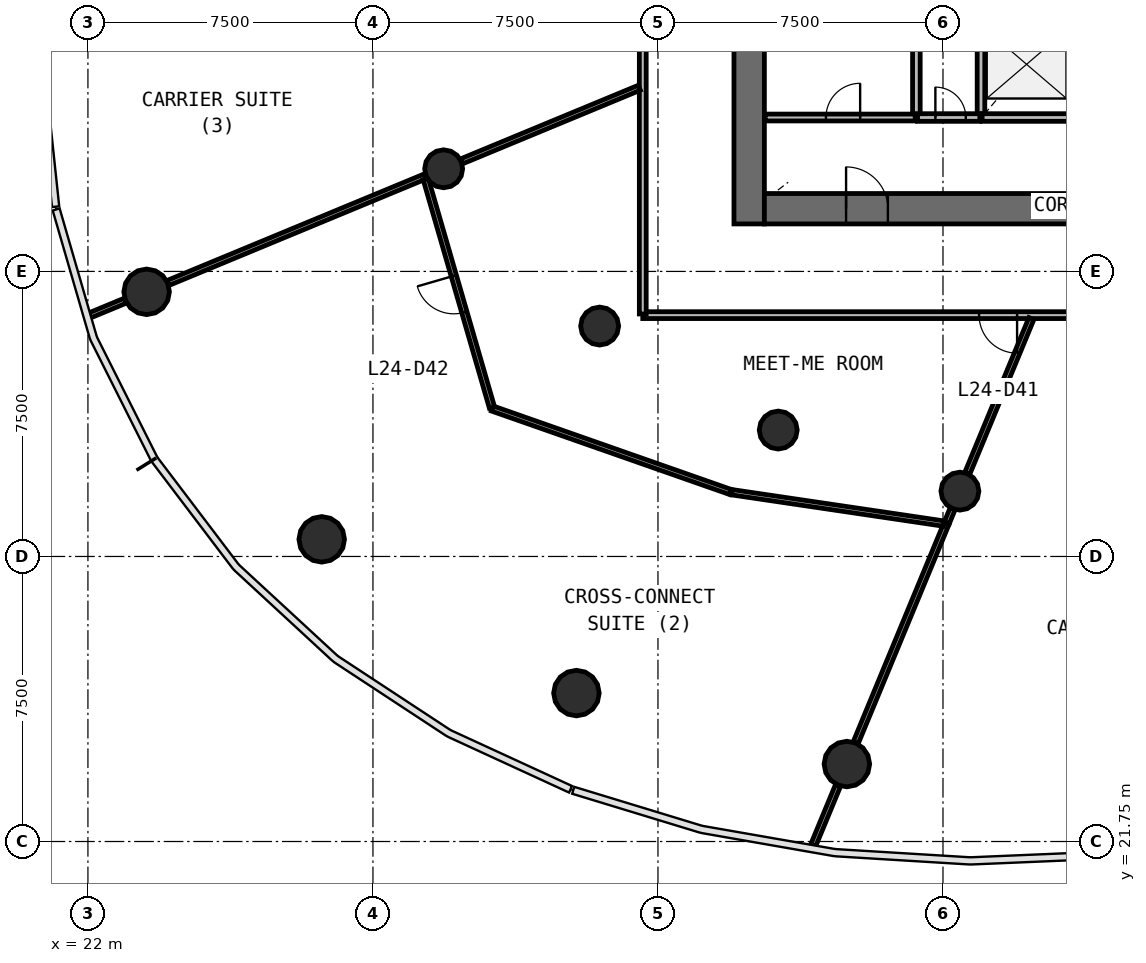
"""IFC4 building model, lengths in metres.
Left out: names, types, materials, properties, quantities, classifications, styles, units other than length and angle.
Written with IfcOpenShell. Run it as: python <this file> out.ifc"""

import sys

from ifc_helpers import new_model, si_unit, direction, frame, frame_2d, origin, origin_2d, place, context, subcontext, project, spatial, rectangle, circle, extrude, source, transform, mapped, element, fill, save


model = new_model("IFC4")
c1 = context("Model", 3, precision=1e-05, world=origin(), true_north=direction((0.0, 1.0)))
c2 = subcontext(c1, "Body", "Model", "MODEL_VIEW")
j1 = project(units=[si_unit("LENGTHUNIT", "METRE"), si_unit("PLANEANGLEUNIT", "RADIAN")], contexts=[c1])
p1 = place(None, origin())
s1 = spatial("IfcSite", under=j1, at=p1, CompositionType="ELEMENT")
p2 = place(p1, origin())
s2 = spatial("IfcBuilding", under=s1, at=p2, CompositionType="ELEMENT")
p3 = place(p2, frame((0.0, 0.0, 104.4)))
s3 = spatial("IfcBuildingStorey", under=s2, at=p3, CompositionType="ELEMENT", Elevation=104.4)
p4 = place(p3, frame((39.4, 58.0, 0.0), z_axis=(0.0, 0.0, 1.0), x_axis=(0.0, -1.0, 0.0)))
e1 = element("IfcWall", 1, at=p4, inside=s3, PredefinedType="SHEAR", context=c2, shape_type="SweptSolid", body=[
    extrude(rectangle(XDim=20.0, YDim=0.8, at=frame_2d((10.0, 0.0))), origin(), (0.0, 0.0, 1.0), 4.1),
])
p5 = place(p4, frame((9.1, 0.0, 0.0)))
e2 = element("IfcOpeningElement", 2, at=p5, cuts=e1, PredefinedType="OPENING", context=c2, shape_type="SweptSolid", body=[
    extrude(rectangle(XDim=1.8, YDim=2.1, at=frame_2d((0.9, 1.05))), frame((0.0, 0.41, 0.0), z_axis=(0.0, -1.0, 0.0), x_axis=(1.0, 0.0, 0.0)), (0.0, 0.0, 1.0), 0.82),
])
p6 = place(p3, frame((39.8, 38.4, 0.0), z_axis=(0.0, 0.0, 1.0), x_axis=(1.0, 0.0, 0.0)))
e3 = element("IfcWall", 3, at=p6, inside=s3, PredefinedType="SHEAR", context=c2, shape_type="SweptSolid", body=[
    extrude(rectangle(XDim=24.4, YDim=0.8, at=frame_2d((12.2, 0.0))), origin(), (0.0, 0.0, 1.0), 4.1),
])
p7 = place(p6, frame((21.65, 0.0, 0.0)))
e4 = element("IfcOpeningElement", 4, at=p7, cuts=e3, PredefinedType="OPENING", context=c2, shape_type="SweptSolid", body=[
    extrude(rectangle(XDim=1.1, YDim=2.1, at=frame_2d((0.55, 1.05))), frame((0.0, 0.41, 0.0), z_axis=(0.0, -1.0, 0.0), x_axis=(1.0, 0.0, 0.0)), (0.0, 0.0, 1.0), 0.82),
])
p8 = place(p6, frame((2.15, 0.0, 0.0)))
e5 = element("IfcOpeningElement", 5, at=p8, cuts=e3, PredefinedType="OPENING", context=c2, shape_type="SweptSolid", body=[
    extrude(rectangle(XDim=1.1, YDim=2.1, at=frame_2d((0.55, 1.05))), frame((0.0, 0.41, 0.0), z_axis=(0.0, -1.0, 0.0), x_axis=(1.0, 0.0, 0.0)), (0.0, 0.0, 1.0), 0.82),
])
m1 = source(origin(), c2, "Body", "SweptSolid", [
    extrude(circle(Radius=0.6, at=origin_2d()), origin(), (0.0, 0.0, 1.0), 4.1),
])
for number, where, z_axis, x_axis in (
    (6, (23.544, 36.213, 0.0), (0.0, 0.0, 1.0), (1.0, 0.0, 0.0)),
    (7, (28.152, 29.701, 0.0), (0.0, 0.0, 1.0), (1.0, 0.0, 0.0)),
    (8, (34.854, 25.655, 0.0), (0.0, 0.0, 1.0), (1.0, 0.0, 0.0)),
    (9, (41.971, 23.788, 0.0), (0.0, 0.0, 1.0), (1.0, 0.0, 0.0)),
):
    element("IfcColumn", number, at=place(p3, frame(where, z_axis=z_axis, x_axis=x_axis)), inside=s3, PredefinedType="COLUMN", context=c2, shape_type="MappedRepresentation", body=[
        mapped(m1, transform((0.0, 0.0, 0.0), scale=1.0)),
    ])
m2 = source(origin(), c2, "Body", "SweptSolid", [
    extrude(circle(Radius=0.5, at=origin_2d()), origin(), (0.0, 0.0, 1.0), 4.1),
])
for number, where, z_axis, x_axis in (
    (10, (31.361, 39.451, 0.0), (0.0, 0.0, 1.0), (1.0, 0.0, 0.0)),
    (11, (35.465, 35.312, 0.0), (0.0, 0.0, 1.0), (1.0, 0.0, 0.0)),
    (12, (40.165, 32.576, 0.0), (0.0, 0.0, 1.0), (1.0, 0.0, 0.0)),
    (13, (44.945, 30.969, 0.0), (0.0, 0.0, 1.0), (1.0, 0.0, 0.0)),
):
    element("IfcColumn", number, at=place(p3, frame(where, z_axis=z_axis, x_axis=x_axis)), inside=s3, PredefinedType="COLUMN", context=c2, shape_type="MappedRepresentation", body=[
        mapped(m2, transform((0.0, 0.0, 0.0), scale=1.0)),
    ])
for number, where, z_axis, x_axis in (
    (14, (43.8, 43.6, 0.0), (0.0, 0.0, 1.0), (0.0, -1.0, 0.0)),
    (15, (45.5, 43.6, 0.0), (0.0, 0.0, 1.0), (0.0, -1.0, 0.0)),
):
    element("IfcWall", number, at=place(p3, frame(where, z_axis=z_axis, x_axis=x_axis)), inside=s3, PredefinedType="SOLIDWALL", context=c2, shape_type="SweptSolid", body=[
        extrude(rectangle(XDim=2.8, YDim=0.2, at=frame_2d((1.4, 0.0))), origin(), (0.0, 0.0, 1.0), 3.7),
    ])
p9 = place(p3, frame((45.53, 40.8, 0.0), z_axis=(0.0, 0.0, 1.0), x_axis=(1.0, 0.0, 0.0)))
e16 = element("IfcWall", 16, at=p9, inside=s3, PredefinedType="SOLIDWALL", context=c2, shape_type="SweptSolid", body=[
    extrude(rectangle(XDim=2.34, YDim=0.2, at=frame_2d((1.17, 0.0))), origin(), (0.0, 0.0, 1.0), 3.7),
])
p10 = place(p3, frame((43.83, 40.8, 0.0), z_axis=(0.0, 0.0, 1.0), x_axis=(1.0, 0.0, 0.0)))
e17 = element("IfcWall", 17, at=p10, inside=s3, PredefinedType="SOLIDWALL", context=c2, shape_type="SweptSolid", body=[
    extrude(rectangle(XDim=1.64, YDim=0.2, at=frame_2d((0.82, 0.0))), origin(), (0.0, 0.0, 1.0), 3.7),
])
p11 = place(p10, frame((0.47, 0.0, 0.0)))
e18 = element("IfcOpeningElement", 18, at=p11, cuts=e17, PredefinedType="OPENING", context=c2, shape_type="SweptSolid", body=[
    extrude(rectangle(XDim=0.8, YDim=2.1, at=frame_2d((0.4, 1.05))), frame((0.0, 0.11, 0.0), z_axis=(0.0, -1.0, 0.0), x_axis=(1.0, 0.0, 0.0)), (0.0, 0.0, 1.0), 0.22),
])
p12 = place(p3, frame((67.4, 35.6, 0.0), z_axis=(0.0, 0.0, 1.0), x_axis=(-1.0, 0.0, 0.0)))
e19 = element("IfcWall", 19, at=p12, inside=s3, PredefinedType="PARTITIONING", context=c2, shape_type="SweptSolid", body=[
    extrude(rectangle(XDim=30.8, YDim=0.18, at=frame_2d((15.4, 0.0))), origin(), (0.0, 0.0, 1.0), 2.9),
])
p13 = place(p12, frame((9.05, 0.0, 0.0)))
e20 = element("IfcOpeningElement", 20, at=p13, cuts=e19, PredefinedType="OPENING", context=c2, shape_type="SweptSolid", body=[
    extrude(rectangle(XDim=0.9, YDim=2.1, at=frame_2d((0.45, 1.05))), frame((0.0, 0.1, 0.0), z_axis=(0.0, -1.0, 0.0), x_axis=(1.0, 0.0, 0.0)), (0.0, 0.0, 1.0), 0.2),
])
p14 = place(p12, frame((6.05, 0.0, 0.0)))
e21 = element("IfcOpeningElement", 21, at=p14, cuts=e19, PredefinedType="OPENING", context=c2, shape_type="SweptSolid", body=[
    extrude(rectangle(XDim=0.9, YDim=2.1, at=frame_2d((0.45, 1.05))), frame((0.0, 0.1, 0.0), z_axis=(0.0, -1.0, 0.0), x_axis=(1.0, 0.0, 0.0)), (0.0, 0.0, 1.0), 0.2),
])
p15 = place(p12, frame((2.45, 0.0, 0.0)))
e22 = element("IfcOpeningElement", 22, at=p15, cuts=e19, PredefinedType="OPENING", context=c2, shape_type="SweptSolid", body=[
    extrude(rectangle(XDim=0.9, YDim=2.1, at=frame_2d((0.45, 1.05))), frame((0.0, 0.1, 0.0), z_axis=(0.0, -1.0, 0.0), x_axis=(1.0, 0.0, 0.0)), (0.0, 0.0, 1.0), 0.2),
])
p16 = place(p12, frame((20.95, 0.0, 0.0)))
e23 = element("IfcOpeningElement", 23, at=p16, cuts=e19, PredefinedType="OPENING", context=c2, shape_type="SweptSolid", body=[
    extrude(rectangle(XDim=1.0, YDim=2.1, at=frame_2d((0.5, 1.05))), frame((0.0, 0.1, 0.0), z_axis=(0.0, -1.0, 0.0), x_axis=(1.0, 0.0, 0.0)), (0.0, 0.0, 1.0), 0.2),
])
p17 = place(p12, frame((14.95, 0.0, 0.0)))
e24 = element("IfcOpeningElement", 24, at=p17, cuts=e19, PredefinedType="OPENING", context=c2, shape_type="SweptSolid", body=[
    extrude(rectangle(XDim=1.0, YDim=2.1, at=frame_2d((0.5, 1.05))), frame((0.0, 0.1, 0.0), z_axis=(0.0, -1.0, 0.0), x_axis=(1.0, 0.0, 0.0)), (0.0, 0.0, 1.0), 0.2),
])
p18 = place(p12, frame((12.55, 0.0, 0.0)))
e25 = element("IfcOpeningElement", 25, at=p18, cuts=e19, PredefinedType="OPENING", context=c2, shape_type="SweptSolid", body=[
    extrude(rectangle(XDim=1.0, YDim=2.1, at=frame_2d((0.5, 1.05))), frame((0.0, 0.1, 0.0), z_axis=(0.0, -1.0, 0.0), x_axis=(1.0, 0.0, 0.0)), (0.0, 0.0, 1.0), 0.2),
])
p19 = place(p3, frame((36.6, 35.63, 0.0), z_axis=(0.0, 0.0, 1.0), x_axis=(0.0, 1.0, 0.0)))
e26 = element("IfcWall", 26, at=p19, inside=s3, PredefinedType="PARTITIONING", context=c2, shape_type="SweptSolid", body=[
    extrude(rectangle(XDim=23.583, YDim=0.18, at=frame_2d((11.791, 0.0))), origin(), (0.0, 0.0, 1.0), 2.9),
])
p20 = place(p19, frame((11.333, 0.0, 0.0)))
e27 = element("IfcOpeningElement", 27, at=p20, cuts=e26, PredefinedType="OPENING", context=c2, shape_type="SweptSolid", body=[
    extrude(rectangle(XDim=1.0, YDim=2.1, at=frame_2d((0.5, 1.05))), frame((0.0, 0.1, 0.0), z_axis=(0.0, -1.0, 0.0), x_axis=(1.0, 0.0, 0.0)), (0.0, 0.0, 1.0), 0.2),
])
p21 = place(p19, frame((9.133, 0.0, 0.0)))
e28 = element("IfcOpeningElement", 28, at=p21, cuts=e26, PredefinedType="OPENING", context=c2, shape_type="SweptSolid", body=[
    extrude(rectangle(XDim=1.0, YDim=2.1, at=frame_2d((0.5, 1.05))), frame((0.0, 0.1, 0.0), z_axis=(0.0, -1.0, 0.0), x_axis=(1.0, 0.0, 0.0)), (0.0, 0.0, 1.0), 0.2),
])
p22 = place(p3, frame((39.82, 40.8, 0.0), z_axis=(0.0, 0.0, 1.0), x_axis=(1.0, 0.0, 0.0)))
e29 = element("IfcWall", 29, at=p22, inside=s3, PredefinedType="PARTITIONING", context=c2, shape_type="SweptSolid", body=[
    extrude(rectangle(XDim=3.95, YDim=0.18, at=frame_2d((1.975, 0.0))), origin(), (0.0, 0.0, 1.0), 3.7),
])
p23 = place(p22, frame((1.6, 0.0, 0.0)))
e30 = element("IfcOpeningElement", 30, at=p23, cuts=e29, PredefinedType="OPENING", context=c2, shape_type="SweptSolid", body=[
    extrude(rectangle(XDim=0.9, YDim=2.1, at=frame_2d((0.45, 1.05))), frame((0.0, 0.1, 0.0), z_axis=(0.0, -1.0, 0.0), x_axis=(1.0, 0.0, 0.0)), (0.0, 0.0, 1.0), 0.2),
])
p24 = place(p3, frame((30.87, 39.248, 0.0), z_axis=(0.0, 0.0, 1.0), x_axis=(-0.923871790576, -0.382702122514, 0.0)))
e31 = element("IfcWall", 31, at=p24, inside=s3, PredefinedType="PARTITIONING", context=c2, shape_type="SweptSolid", body=[
    extrude(rectangle(XDim=7.324, YDim=0.14, at=frame_2d((3.662, 0.0))), origin(), (0.0, 0.0, 1.0), 2.9),
])
p25 = place(p3, frame((32.639, 33.144, 0.0), z_axis=(0.0, 0.0, 1.0), x_axis=(0.943712844309, -0.330765880173, 0.0)))
e32 = element("IfcWall", 32, at=p25, inside=s3, PredefinedType="PARTITIONING", context=c2, shape_type="SweptSolid", body=[
    extrude(rectangle(XDim=6.648, YDim=0.14, at=frame_2d((3.324, 0.0))), origin(), (0.0, 0.0, 1.0), 2.9),
])
p26 = place(p3, frame((32.631, 33.173, 0.0), z_axis=(0.0, 0.0, 1.0), x_axis=(-0.278343340878, 0.960481641984, 0.0)))
e33 = element("IfcWall", 33, at=p26, inside=s3, PredefinedType="PARTITIONING", context=c2, shape_type="SweptSolid", body=[
    extrude(rectangle(XDim=6.255, YDim=0.14, at=frame_2d((3.127, 0.0))), origin(), (0.0, 0.0, 1.0), 2.9),
])
p27 = place(p26, frame((2.604, 0.0, 0.0)))
e34 = element("IfcOpeningElement", 34, at=p27, cuts=e33, PredefinedType="OPENING", context=c2, shape_type="SweptSolid", body=[
    extrude(rectangle(XDim=1.0, YDim=2.1, at=frame_2d((0.5, 1.05))), frame((0.0, 0.08, 0.0), z_axis=(0.0, -1.0, 0.0), x_axis=(1.0, 0.0, 0.0)), (0.0, 0.0, 1.0), 0.16),
])
p28 = place(p3, frame((44.588, 30.106, 0.0), z_axis=(0.0, 0.0, 1.0), x_axis=(-0.382687319502, -0.923877922397, 0.0)))
e35 = element("IfcWall", 35, at=p28, inside=s3, PredefinedType="PARTITIONING", context=c2, shape_type="SweptSolid", body=[
    extrude(rectangle(XDim=6.234, YDim=0.14, at=frame_2d((3.117, 0.0))), origin(), (0.0, 0.0, 1.0), 2.9),
])
p29 = place(p3, frame((38.943, 30.94, 0.0), z_axis=(0.0, 0.0, 1.0), x_axis=(0.98924251215, -0.146284832283, 0.0)))
e36 = element("IfcWall", 36, at=p29, inside=s3, PredefinedType="PARTITIONING", context=c2, shape_type="SweptSolid", body=[
    extrude(rectangle(XDim=5.634, YDim=0.14, at=frame_2d((2.817, 0.0))), origin(), (0.0, 0.0, 1.0), 2.9),
])
p30 = place(p3, frame((36.51, 41.584, 0.0), z_axis=(0.0, 0.0, 1.0), x_axis=(-0.923890025086, -0.382658100067, 0.0)))
e37 = element("IfcWall", 37, at=p30, inside=s3, PredefinedType="PARTITIONING", context=c2, shape_type="SweptSolid", body=[
    extrude(rectangle(XDim=5.068, YDim=0.14, at=frame_2d((2.534, 0.0))), origin(), (0.0, 0.0, 1.0), 2.9),
])
p31 = place(p3, frame((46.826, 35.51, 0.0), z_axis=(0.0, 0.0, 1.0), x_axis=(-0.382672831764, -0.923883923353, 0.0)))
e38 = element("IfcWall", 38, at=p31, inside=s3, PredefinedType="PARTITIONING", context=c2, shape_type="SweptSolid", body=[
    extrude(rectangle(XDim=4.41, YDim=0.14, at=frame_2d((2.205, 0.0))), origin(), (0.0, 0.0, 1.0), 2.9),
])
p32 = place(p3, frame((41.74, 23.229, 0.0), z_axis=(0.0, 0.0, 1.0), x_axis=(-0.382769756697, -0.923843771077, 0.0)))
e39 = element("IfcWall", 39, at=p32, inside=s3, PredefinedType="PARTITIONING", context=c2, shape_type="SweptSolid", body=[
    extrude(rectangle(XDim=1.719, YDim=0.14, at=frame_2d((0.86, 0.0))), origin(), (0.0, 0.0, 1.0), 2.9),
])
p33 = place(p3, frame((22.986, 35.982, 0.0), z_axis=(0.0, 0.0, 1.0), x_axis=(-0.923909071339, -0.38261211154, 0.0)))
e40 = element("IfcWall", 40, at=p33, inside=s3, PredefinedType="PARTITIONING", context=c2, shape_type="SweptSolid", body=[
    extrude(rectangle(XDim=1.021, YDim=0.14, at=frame_2d((0.511, 0.0))), origin(), (0.0, 0.0, 1.0), 2.9),
])
p34 = place(p3, frame((44.752, 30.502, 0.0), z_axis=(0.0, 0.0, 1.0), x_axis=(-0.382441868588, -0.923979554509, 0.0)))
e41 = element("IfcWall", 41, at=p34, inside=s3, PredefinedType="PARTITIONING", context=c2, shape_type="SweptSolid", body=[
    extrude(rectangle(XDim=0.399, YDim=0.14, at=frame_2d((0.199, 0.0))), origin(), (0.0, 0.0, 1.0), 2.9),
])
m3 = source(origin(), c2, "Body", "SweptSolid", [
    extrude(rectangle(XDim=0.8, YDim=2.1, at=frame_2d((0.4, 1.05))), frame((0.0, 0.025, 0.0), z_axis=(0.0, -1.0, 0.0), x_axis=(1.0, 0.0, 0.0)), (0.0, 0.0, 1.0), 0.05),
])
p35 = place(p11, origin())
e42 = element("IfcDoor", 42, at=p35, inside=s3, OperationType="SINGLE_SWING_LEFT", PredefinedType="DOOR", context=c2, shape_type="MappedRepresentation", body=[
    mapped(m3, transform((0.0, 0.0, 0.0), scale=1.0)),
])
fill(e18, e42)
m4 = source(origin(), c2, "Body", "SweptSolid", [
    extrude(rectangle(XDim=1.1, YDim=2.1, at=frame_2d((0.55, 1.05))), frame((0.0, 0.025, 0.0), z_axis=(0.0, -1.0, 0.0), x_axis=(1.0, 0.0, 0.0)), (0.0, 0.0, 1.0), 0.05),
])
p36 = place(p8, origin())
e43 = element("IfcDoor", 43, at=p36, inside=s3, OperationType="SINGLE_SWING_LEFT", PredefinedType="DOOR", context=c2, shape_type="MappedRepresentation", body=[
    mapped(m4, transform((0.0, 0.0, 0.0), scale=1.0)),
])
fill(e5, e43)
m5 = source(origin(), c2, "Body", "SweptSolid", [
    extrude(rectangle(XDim=1.0, YDim=2.1, at=frame_2d((0.5, 1.05))), frame((0.0, 0.025, 0.0), z_axis=(0.0, -1.0, 0.0), x_axis=(1.0, 0.0, 0.0)), (0.0, 0.0, 1.0), 0.05),
])
p37 = place(p16, origin())
e44 = element("IfcDoor", 44, at=p37, inside=s3, OperationType="SINGLE_SWING_LEFT", PredefinedType="DOOR", context=c2, shape_type="MappedRepresentation", body=[
    mapped(m5, transform((0.0, 0.0, 0.0), scale=1.0)),
])
fill(e23, e44)
p38 = place(p27, origin())
e45 = element("IfcDoor", 45, at=p38, inside=s3, OperationType="SINGLE_SWING_RIGHT", PredefinedType="DOOR", context=c2, shape_type="MappedRepresentation", body=[
    mapped(m5, transform((0.0, 0.0, 0.0), scale=1.0)),
])
fill(e34, e45)
m6 = source(origin(), c2, "Body", "SweptSolid", [
    extrude(rectangle(XDim=0.9, YDim=2.1, at=frame_2d((0.45, 1.05))), frame((0.0, 0.025, 0.0), z_axis=(0.0, -1.0, 0.0), x_axis=(1.0, 0.0, 0.0)), (0.0, 0.0, 1.0), 0.05),
])
p39 = place(p23, origin())
e46 = element("IfcDoor", 46, at=p39, inside=s3, OperationType="SINGLE_SWING_RIGHT", PredefinedType="DOOR", context=c2, shape_type="MappedRepresentation", body=[
    mapped(m6, transform((0.0, 0.0, 0.0), scale=1.0)),
])
fill(e30, e46)
save(model, sys.argv[1])
